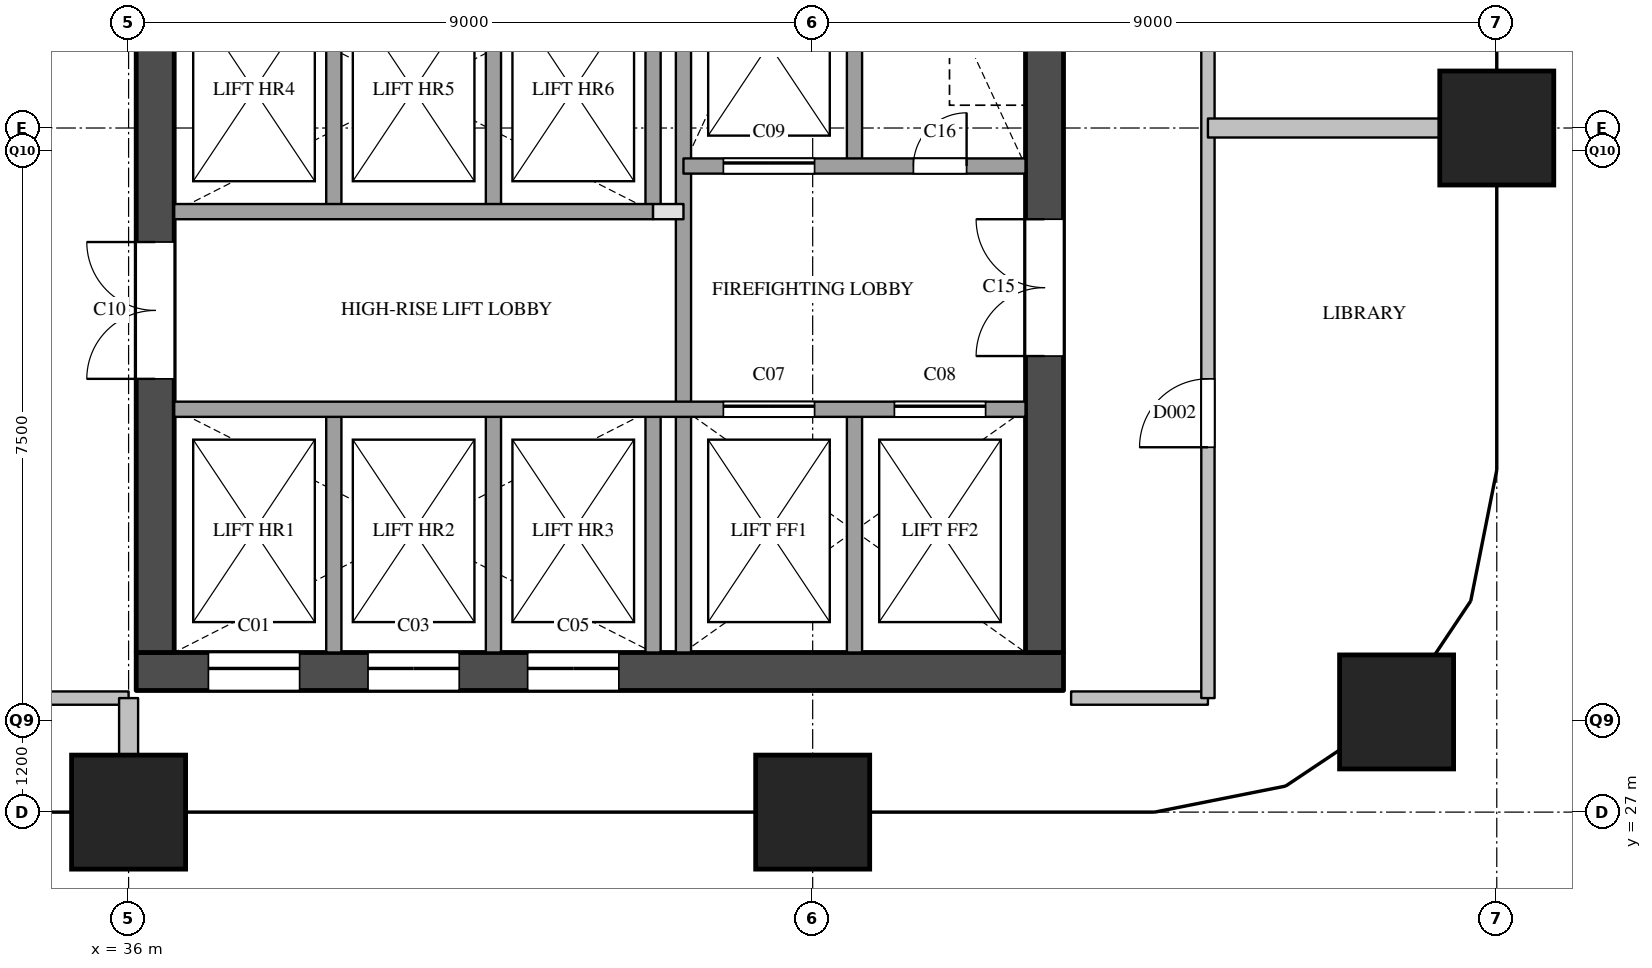
"""IFC4 building model, lengths in metres.
Left out: names, types, materials, properties, quantities, classifications, styles, units other than length and angle.
Written with IfcOpenShell. Run it as: python <this file> out.ifc"""

import sys

from ifc_helpers import new_model, si_unit, direction, frame, frame_2d, origin, origin_2d, place, context, subcontext, project, spatial, rectangle, extrude, element, fill, save


model = new_model("IFC4")
c1 = context("Model", 3, precision=1e-05, world=origin(), true_north=direction((0.0, 1.0)))
c2 = subcontext(c1, "Body", "Model", "MODEL_VIEW")
j1 = project(units=[si_unit("LENGTHUNIT", "METRE"), si_unit("PLANEANGLEUNIT", "RADIAN")], contexts=[c1])
p1 = place(None, origin())
s1 = spatial("IfcSite", under=j1, at=p1, CompositionType="ELEMENT")
p2 = place(p1, origin())
s2 = spatial("IfcBuilding", under=s1, at=p2, CompositionType="ELEMENT")
p3 = place(p2, frame((0.0, 0.0, 185.6)))
s3 = spatial("IfcBuildingStorey", under=s2, at=p3, CompositionType="ELEMENT", Elevation=185.6)
for number, where, z_axis, x_axis in (
    (1, (36.0, 27.0, 0.0), (0.0, 0.0, 1.0), (1.0, 0.0, 0.0)),
    (2, (45.0, 27.0, 0.0), (0.0, 0.0, 1.0), (1.0, 0.0, 0.0)),
    (3, (52.682, 28.318, 0.0), (0.0, 0.0, 1.0), (1.0, 0.0, 0.0)),
    (4, (54.0, 36.0, 0.0), (0.0, 0.0, 1.0), (1.0, 0.0, 0.0)),
):
    element("IfcColumn", number, at=place(p3, frame(where, z_axis=z_axis, x_axis=x_axis)), inside=s3, PredefinedType="COLUMN", context=c2, shape_type="SweptSolid", body=[
        extrude(rectangle(XDim=1.5, YDim=1.5, at=origin_2d()), origin(), (0.0, 0.0, 1.0), 3.9),
    ])
p4 = place(p3, frame((36.1, 28.85, 0.0), z_axis=(0.0, 0.0, 1.0), x_axis=(1.0, 0.0, 0.0)))
e5 = element("IfcWall", 5, at=p4, inside=s3, PredefinedType="SHEAR", context=c2, shape_type="SweptSolid", body=[
    extrude(rectangle(XDim=12.2, YDim=0.5, at=frame_2d((6.1, 0.0))), origin(), (0.0, 0.0, 1.0), 3.6),
])
p5 = place(p4, frame((0.95, 0.0, 0.0)))
e6 = element("IfcOpeningElement", 6, at=p5, cuts=e5, PredefinedType="OPENING", context=c2, shape_type="SweptSolid", body=[
    extrude(rectangle(XDim=1.2, YDim=2.1, at=frame_2d((0.6, 1.05))), frame((0.0, 0.26, 0.0), z_axis=(0.0, -1.0, 0.0), x_axis=(1.0, 0.0, 0.0)), (0.0, 0.0, 1.0), 0.52),
])
p6 = place(p4, frame((3.05, 0.0, 0.0)))
e7 = element("IfcOpeningElement", 7, at=p6, cuts=e5, PredefinedType="OPENING", context=c2, shape_type="SweptSolid", body=[
    extrude(rectangle(XDim=1.2, YDim=2.1, at=frame_2d((0.6, 1.05))), frame((0.0, 0.26, 0.0), z_axis=(0.0, -1.0, 0.0), x_axis=(1.0, 0.0, 0.0)), (0.0, 0.0, 1.0), 0.52),
])
p7 = place(p4, frame((5.15, 0.0, 0.0)))
e8 = element("IfcOpeningElement", 8, at=p7, cuts=e5, PredefinedType="OPENING", context=c2, shape_type="SweptSolid", body=[
    extrude(rectangle(XDim=1.2, YDim=2.1, at=frame_2d((0.6, 1.05))), frame((0.0, 0.26, 0.0), z_axis=(0.0, -1.0, 0.0), x_axis=(1.0, 0.0, 0.0)), (0.0, 0.0, 1.0), 0.52),
])
p8 = place(p3, frame((36.35, 29.1, 0.0), z_axis=(0.0, 0.0, 1.0), x_axis=(0.0, 1.0, 0.0)))
e9 = element("IfcWall", 9, at=p8, inside=s3, PredefinedType="SHEAR", context=c2, shape_type="SweptSolid", body=[
    extrude(rectangle(XDim=20.3, YDim=0.5, at=frame_2d((10.15, 0.0))), origin(), (0.0, 0.0, 1.0), 3.6),
])
p9 = place(p8, frame((3.6, 0.0, 0.0)))
e10 = element("IfcOpeningElement", 10, at=p9, cuts=e9, PredefinedType="OPENING", context=c2, shape_type="SweptSolid", body=[
    extrude(rectangle(XDim=1.8, YDim=2.1, at=frame_2d((0.9, 1.05))), frame((0.0, 0.26, 0.0), z_axis=(0.0, -1.0, 0.0), x_axis=(1.0, 0.0, 0.0)), (0.0, 0.0, 1.0), 0.52),
])
p10 = place(p8, frame((16.4, 0.0, 0.0)))
e11 = element("IfcOpeningElement", 11, at=p10, cuts=e9, PredefinedType="OPENING", context=c2, shape_type="SweptSolid", body=[
    extrude(rectangle(XDim=1.0, YDim=2.1, at=frame_2d((0.5, 1.05))), frame((0.0, 0.26, 0.0), z_axis=(0.0, -1.0, 0.0), x_axis=(1.0, 0.0, 0.0)), (0.0, 0.0, 1.0), 0.52),
])
p11 = place(p3, frame((48.05, 29.1, 0.0), z_axis=(0.0, 0.0, 1.0), x_axis=(0.0, 1.0, 0.0)))
e12 = element("IfcWall", 12, at=p11, inside=s3, PredefinedType="SHEAR", context=c2, shape_type="SweptSolid", body=[
    extrude(rectangle(XDim=20.3, YDim=0.5, at=frame_2d((10.15, 0.0))), origin(), (0.0, 0.0, 1.0), 3.6),
])
p12 = place(p11, frame((12.5, 0.0, 0.0)))
e13 = element("IfcOpeningElement", 13, at=p12, cuts=e12, PredefinedType="OPENING", context=c2, shape_type="SweptSolid", body=[
    extrude(rectangle(XDim=0.7, YDim=2.1, at=frame_2d((0.35, 1.05))), frame((0.0, 0.26, 0.0), z_axis=(0.0, -1.0, 0.0), x_axis=(1.0, 0.0, 0.0)), (0.0, 0.0, 1.0), 0.52),
])
p13 = place(p11, frame((3.9, 0.0, 0.0)))
e14 = element("IfcOpeningElement", 14, at=p13, cuts=e12, PredefinedType="OPENING", context=c2, shape_type="SweptSolid", body=[
    extrude(rectangle(XDim=1.8, YDim=2.1, at=frame_2d((0.9, 1.05))), frame((0.0, 0.26, 0.0), z_axis=(0.0, -1.0, 0.0), x_axis=(1.0, 0.0, 0.0)), (0.0, 0.0, 1.0), 0.52),
])
p14 = place(p3, frame((38.7, 29.1, 0.0), z_axis=(0.0, 0.0, 1.0), x_axis=(0.0, 1.0, 0.0)))
e15 = element("IfcWall", 15, at=p14, inside=s3, PredefinedType="SOLIDWALL", context=c2, shape_type="SweptSolid", body=[
    extrude(rectangle(XDim=3.2, YDim=0.2, at=frame_2d((1.6, 0.0))), origin(), (0.0, 0.0, 1.0), 3.6),
])
p15 = place(p3, frame((38.7, 34.9, 0.0), z_axis=(0.0, 0.0, 1.0), x_axis=(0.0, 1.0, 0.0)))
e16 = element("IfcWall", 16, at=p15, inside=s3, PredefinedType="SOLIDWALL", context=c2, shape_type="SweptSolid", body=[
    extrude(rectangle(XDim=3.2, YDim=0.2, at=frame_2d((1.6, 0.0))), origin(), (0.0, 0.0, 1.0), 3.6),
])
p16 = place(p3, frame((40.8, 29.1, 0.0), z_axis=(0.0, 0.0, 1.0), x_axis=(0.0, 1.0, 0.0)))
e17 = element("IfcWall", 17, at=p16, inside=s3, PredefinedType="SOLIDWALL", context=c2, shape_type="SweptSolid", body=[
    extrude(rectangle(XDim=3.2, YDim=0.2, at=frame_2d((1.6, 0.0))), origin(), (0.0, 0.0, 1.0), 3.6),
])
p17 = place(p3, frame((40.8, 34.9, 0.0), z_axis=(0.0, 0.0, 1.0), x_axis=(0.0, 1.0, 0.0)))
e18 = element("IfcWall", 18, at=p17, inside=s3, PredefinedType="SOLIDWALL", context=c2, shape_type="SweptSolid", body=[
    extrude(rectangle(XDim=3.2, YDim=0.2, at=frame_2d((1.6, 0.0))), origin(), (0.0, 0.0, 1.0), 3.6),
])
p18 = place(p3, frame((42.9, 29.1, 0.0), z_axis=(0.0, 0.0, 1.0), x_axis=(0.0, 1.0, 0.0)))
e19 = element("IfcWall", 19, at=p18, inside=s3, PredefinedType="SOLIDWALL", context=c2, shape_type="SweptSolid", body=[
    extrude(rectangle(XDim=3.2, YDim=0.2, at=frame_2d((1.6, 0.0))), origin(), (0.0, 0.0, 1.0), 3.6),
])
p19 = place(p3, frame((42.9, 34.9, 0.0), z_axis=(0.0, 0.0, 1.0), x_axis=(0.0, 1.0, 0.0)))
e20 = element("IfcWall", 20, at=p19, inside=s3, PredefinedType="SOLIDWALL", context=c2, shape_type="SweptSolid", body=[
    extrude(rectangle(XDim=3.2, YDim=0.2, at=frame_2d((1.6, 0.0))), origin(), (0.0, 0.0, 1.0), 3.6),
])
p20 = place(p3, frame((43.3, 29.1, 0.0), z_axis=(0.0, 0.0, 1.0), x_axis=(0.0, 1.0, 0.0)))
e21 = element("IfcWall", 21, at=p20, inside=s3, PredefinedType="SOLIDWALL", context=c2, shape_type="SweptSolid", body=[
    extrude(rectangle(XDim=9.9, YDim=0.2, at=frame_2d((4.95, 0.0))), origin(), (0.0, 0.0, 1.0), 3.6),
])
for number, where, z_axis, x_axis in (
    (22, (45.55, 29.1, 0.0), (0.0, 0.0, 1.0), (0.0, 1.0, 0.0)),
    (23, (45.55, 35.5, 0.0), (0.0, 0.0, 1.0), (0.0, 1.0, 0.0)),
):
    element("IfcWall", number, at=place(p3, frame(where, z_axis=z_axis, x_axis=x_axis)), inside=s3, PredefinedType="SOLIDWALL", context=c2, shape_type="SweptSolid", body=[
        extrude(rectangle(XDim=3.2, YDim=0.2, at=frame_2d((1.6, 0.0))), origin(), (0.0, 0.0, 1.0), 3.6),
    ])
p21 = place(p3, frame((36.6, 32.3, 0.0), z_axis=(0.0, 0.0, 1.0), x_axis=(1.0, 0.0, 0.0)))
e24 = element("IfcWall", 24, at=p21, inside=s3, PredefinedType="SOLIDWALL", context=c2, shape_type="SweptSolid", body=[
    extrude(rectangle(XDim=11.2, YDim=0.2, at=frame_2d((5.6, 0.0))), origin(), (0.0, 0.0, 1.0), 3.6),
])
p22 = place(p21, frame((7.225, 0.0, 0.0)))
e25 = element("IfcOpeningElement", 25, at=p22, cuts=e24, PredefinedType="OPENING", context=c2, shape_type="SweptSolid", body=[
    extrude(rectangle(XDim=1.2, YDim=2.1, at=frame_2d((0.6, 1.05))), frame((0.0, 0.11, 0.0), z_axis=(0.0, -1.0, 0.0), x_axis=(1.0, 0.0, 0.0)), (0.0, 0.0, 1.0), 0.22),
])
p23 = place(p21, frame((9.475, 0.0, 0.0)))
e26 = element("IfcOpeningElement", 26, at=p23, cuts=e24, PredefinedType="OPENING", context=c2, shape_type="SweptSolid", body=[
    extrude(rectangle(XDim=1.2, YDim=2.1, at=frame_2d((0.6, 1.05))), frame((0.0, 0.11, 0.0), z_axis=(0.0, -1.0, 0.0), x_axis=(1.0, 0.0, 0.0)), (0.0, 0.0, 1.0), 0.22),
])
p24 = place(p3, frame((42.9, 34.9, 0.0), z_axis=(0.0, 0.0, 1.0), x_axis=(1.0, 0.0, 0.0)))
e27 = element("IfcWall", 27, at=p24, inside=s3, PredefinedType="PARTITIONING", context=c2, shape_type="SweptSolid", body=[
    extrude(rectangle(XDim=0.4, YDim=0.2, at=frame_2d((0.2, 0.0))), origin(), (0.0, 0.0, 1.0), 3.6),
])
p25 = place(p3, frame((36.6, 34.9, 0.0), z_axis=(0.0, 0.0, 1.0), x_axis=(1.0, 0.0, 0.0)))
e28 = element("IfcWall", 28, at=p25, inside=s3, PredefinedType="SOLIDWALL", context=c2, shape_type="SweptSolid", body=[
    extrude(rectangle(XDim=6.3, YDim=0.2, at=frame_2d((3.15, 0.0))), origin(), (0.0, 0.0, 1.0), 3.6),
])
p26 = place(p3, frame((43.3, 35.5, 0.0), z_axis=(0.0, 0.0, 1.0), x_axis=(1.0, 0.0, 0.0)))
e29 = element("IfcWall", 29, at=p26, inside=s3, PredefinedType="SOLIDWALL", context=c2, shape_type="SweptSolid", body=[
    extrude(rectangle(XDim=4.5, YDim=0.2, at=frame_2d((2.25, 0.0))), origin(), (0.0, 0.0, 1.0), 3.6),
])
p27 = place(p26, frame((0.525, 0.0, 0.0)))
e30 = element("IfcOpeningElement", 30, at=p27, cuts=e29, PredefinedType="OPENING", context=c2, shape_type="SweptSolid", body=[
    extrude(rectangle(XDim=1.2, YDim=2.1, at=frame_2d((0.6, 1.05))), frame((0.0, 0.11, 0.0), z_axis=(0.0, -1.0, 0.0), x_axis=(1.0, 0.0, 0.0)), (0.0, 0.0, 1.0), 0.22),
])
p28 = place(p26, frame((3.025, 0.0, 0.0)))
e31 = element("IfcOpeningElement", 31, at=p28, cuts=e29, PredefinedType="OPENING", context=c2, shape_type="SweptSolid", body=[
    extrude(rectangle(XDim=0.7, YDim=2.1, at=frame_2d((0.35, 1.05))), frame((0.0, 0.11, 0.0), z_axis=(0.0, -1.0, 0.0), x_axis=(1.0, 0.0, 0.0)), (0.0, 0.0, 1.0), 0.22),
])
for number, where, z_axis, x_axis in (
    (32, (34.2, 28.5, 0.0), (0.0, 0.0, 1.0), (1.0, 0.0, 0.0)),
    (33, (48.4, 28.5, 0.0), (0.0, 0.0, 1.0), (1.0, 0.0, 0.0)),
):
    element("IfcWall", number, at=place(p3, frame(where, z_axis=z_axis, x_axis=x_axis)), inside=s3, PredefinedType="PARTITIONING", context=c2, shape_type="SweptSolid", body=[
        extrude(rectangle(XDim=1.8, YDim=0.175, at=frame_2d((0.9, 0.0))), origin(), (0.0, 0.0, 1.0), 3.6),
    ])
p29 = place(p3, frame((50.2, 28.5, 0.0), z_axis=(0.0, 0.0, 1.0), x_axis=(0.0, 1.0, 0.0)))
e34 = element("IfcWall", 34, at=p29, inside=s3, PredefinedType="PARTITIONING", context=c2, shape_type="SweptSolid", body=[
    extrude(rectangle(XDim=23.3, YDim=0.175, at=frame_2d((11.65, 0.0))), origin(), (0.0, 0.0, 1.0), 3.6),
])
p30 = place(p29, frame((3.3, 0.0, 0.0)))
e35 = element("IfcOpeningElement", 35, at=p30, cuts=e34, PredefinedType="OPENING", context=c2, shape_type="SweptSolid", body=[
    extrude(rectangle(XDim=0.9, YDim=2.1, at=frame_2d((0.45, 1.05))), frame((0.0, 0.097, 0.0), z_axis=(0.0, -1.0, 0.0), x_axis=(1.0, 0.0, 0.0)), (0.0, 0.0, 1.0), 0.195),
])
p31 = place(p29, frame((14.95, 0.0, 0.0)))
e36 = element("IfcOpeningElement", 36, at=p31, cuts=e34, PredefinedType="OPENING", context=c2, shape_type="SweptSolid", body=[
    extrude(rectangle(XDim=0.9, YDim=2.1, at=frame_2d((0.45, 1.05))), frame((0.0, 0.097, 0.0), z_axis=(0.0, -1.0, 0.0), x_axis=(1.0, 0.0, 0.0)), (0.0, 0.0, 1.0), 0.195),
])
p32 = place(p3, frame((50.2, 36.0, 0.0), z_axis=(0.0, 0.0, 1.0), x_axis=(1.0, 0.0, 0.0)))
e37 = element("IfcWall", 37, at=p32, inside=s3, PredefinedType="PARTITIONING", context=c2, shape_type="SweptSolid", body=[
    extrude(rectangle(XDim=3.8, YDim=0.25, at=frame_2d((1.9, 0.0))), origin(), (0.0, 0.0, 1.0), 3.6),
])
p33 = place(p3, frame((36.0, 27.0, 0.0), z_axis=(0.0, 0.0, 1.0), x_axis=(0.0, 1.0, 0.0)))
e38 = element("IfcWall", 38, at=p33, inside=s3, PredefinedType="PARTITIONING", context=c2, shape_type="SweptSolid", body=[
    extrude(rectangle(XDim=1.5, YDim=0.25, at=frame_2d((0.75, 0.0))), origin(), (0.0, 0.0, 1.0), 3.6),
])
p34 = place(p5, origin())
e39 = element("IfcDoor", 39, at=p34, inside=s3, OperationType="SLIDING_TO_LEFT", PredefinedType="DOOR", context=c2, shape_type="SweptSolid", body=[
    extrude(rectangle(XDim=1.2, YDim=2.1, at=frame_2d((0.6, 1.05))), frame((0.0, 0.025, 0.0), z_axis=(0.0, -1.0, 0.0), x_axis=(1.0, 0.0, 0.0)), (0.0, 0.0, 1.0), 0.05),
])
fill(e6, e39)
p35 = place(p6, origin())
e40 = element("IfcDoor", 40, at=p35, inside=s3, OperationType="SLIDING_TO_LEFT", PredefinedType="DOOR", context=c2, shape_type="SweptSolid", body=[
    extrude(rectangle(XDim=1.2, YDim=2.1, at=frame_2d((0.6, 1.05))), frame((0.0, 0.025, 0.0), z_axis=(0.0, -1.0, 0.0), x_axis=(1.0, 0.0, 0.0)), (0.0, 0.0, 1.0), 0.05),
])
fill(e7, e40)
p36 = place(p7, origin())
e41 = element("IfcDoor", 41, at=p36, inside=s3, OperationType="SLIDING_TO_LEFT", PredefinedType="DOOR", context=c2, shape_type="SweptSolid", body=[
    extrude(rectangle(XDim=1.2, YDim=2.1, at=frame_2d((0.6, 1.05))), frame((0.0, 0.025, 0.0), z_axis=(0.0, -1.0, 0.0), x_axis=(1.0, 0.0, 0.0)), (0.0, 0.0, 1.0), 0.05),
])
fill(e8, e41)
p37 = place(p22, origin())
e42 = element("IfcDoor", 42, at=p37, inside=s3, OperationType="SLIDING_TO_LEFT", PredefinedType="DOOR", context=c2, shape_type="SweptSolid", body=[
    extrude(rectangle(XDim=1.2, YDim=2.1, at=frame_2d((0.6, 1.05))), frame((0.0, 0.025, 0.0), z_axis=(0.0, -1.0, 0.0), x_axis=(1.0, 0.0, 0.0)), (0.0, 0.0, 1.0), 0.05),
])
fill(e25, e42)
p38 = place(p23, origin())
e43 = element("IfcDoor", 43, at=p38, inside=s3, OperationType="SLIDING_TO_LEFT", PredefinedType="DOOR", context=c2, shape_type="SweptSolid", body=[
    extrude(rectangle(XDim=1.2, YDim=2.1, at=frame_2d((0.6, 1.05))), frame((0.0, 0.025, 0.0), z_axis=(0.0, -1.0, 0.0), x_axis=(1.0, 0.0, 0.0)), (0.0, 0.0, 1.0), 0.05),
])
fill(e26, e43)
p39 = place(p27, origin())
e44 = element("IfcDoor", 44, at=p39, inside=s3, OperationType="SLIDING_TO_LEFT", PredefinedType="DOOR", context=c2, shape_type="SweptSolid", body=[
    extrude(rectangle(XDim=1.2, YDim=2.1, at=frame_2d((0.6, 1.05))), frame((0.0, 0.025, 0.0), z_axis=(0.0, -1.0, 0.0), x_axis=(1.0, 0.0, 0.0)), (0.0, 0.0, 1.0), 0.05),
])
fill(e30, e44)
p40 = place(p9, origin())
e45 = element("IfcDoor", 45, at=p40, inside=s3, OperationType="DOUBLE_DOOR_SINGLE_SWING", PredefinedType="DOOR", context=c2, shape_type="SweptSolid", body=[
    extrude(rectangle(XDim=1.8, YDim=2.1, at=frame_2d((0.9, 1.05))), frame((0.0, 0.025, 0.0), z_axis=(0.0, -1.0, 0.0), x_axis=(1.0, 0.0, 0.0)), (0.0, 0.0, 1.0), 0.05),
])
fill(e10, e45)
p41 = place(p13, origin())
e46 = element("IfcDoor", 46, at=p41, inside=s3, OperationType="DOUBLE_DOOR_SINGLE_SWING", PredefinedType="DOOR", context=c2, shape_type="SweptSolid", body=[
    extrude(rectangle(XDim=1.8, YDim=2.1, at=frame_2d((0.9, 1.05))), frame((0.0, 0.025, 0.0), z_axis=(0.0, -1.0, 0.0), x_axis=(1.0, 0.0, 0.0)), (0.0, 0.0, 1.0), 0.05),
])
fill(e14, e46)
p42 = place(p28, origin())
e47 = element("IfcDoor", 47, at=p42, inside=s3, OperationType="SINGLE_SWING_RIGHT", PredefinedType="DOOR", context=c2, shape_type="SweptSolid", body=[
    extrude(rectangle(XDim=0.7, YDim=2.1, at=frame_2d((0.35, 1.05))), frame((0.0, 0.025, 0.0), z_axis=(0.0, -1.0, 0.0), x_axis=(1.0, 0.0, 0.0)), (0.0, 0.0, 1.0), 0.05),
])
fill(e31, e47)
p43 = place(p30, origin())
e48 = element("IfcDoor", 48, at=p43, inside=s3, OperationType="SINGLE_SWING_LEFT", PredefinedType="DOOR", context=c2, shape_type="SweptSolid", body=[
    extrude(rectangle(XDim=0.9, YDim=2.1, at=frame_2d((0.45, 1.05))), frame((0.0, 0.025, 0.0), z_axis=(0.0, -1.0, 0.0), x_axis=(1.0, 0.0, 0.0)), (0.0, 0.0, 1.0), 0.05),
])
fill(e35, e48)
save(model, sys.argv[1])
